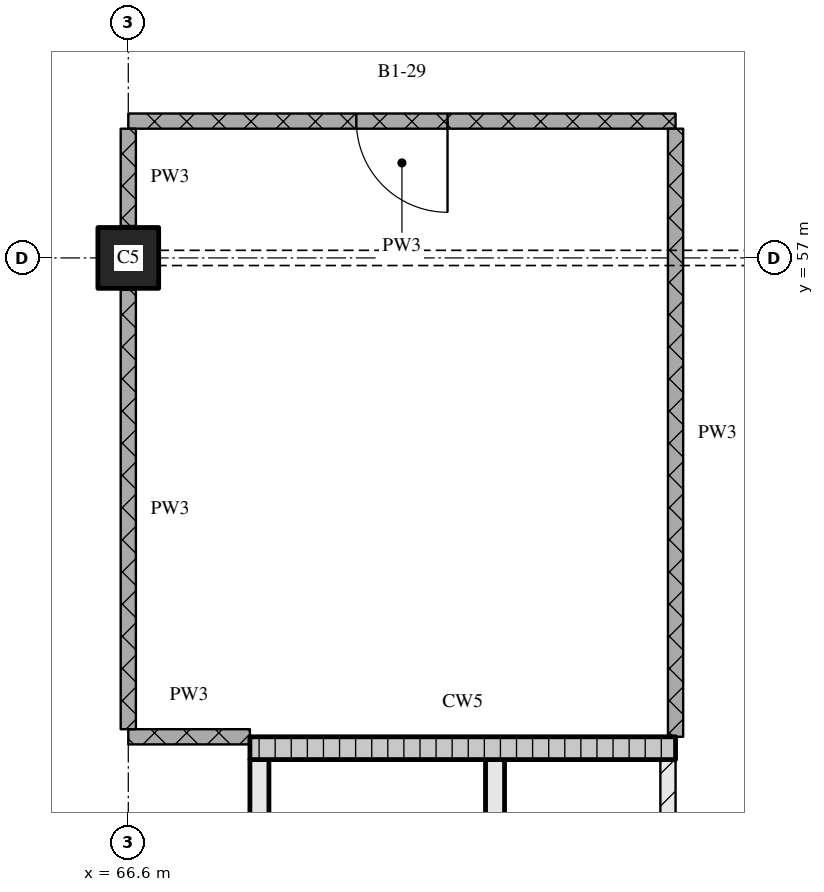
"""IFC4 building model, lengths in metres.
Left out: names, types, materials, properties, quantities, classifications, styles, units other than length and angle.
Written with IfcOpenShell. Run it as: python <this file> out.ifc"""

import sys

from ifc_helpers import new_model, si_unit, direction, frame, frame_2d, origin, origin_2d, place, context, subcontext, project, spatial, rectangle, extrude, element, fill, save


model = new_model("IFC4")
c1 = context("Model", 3, precision=1e-05, world=origin(), true_north=direction((0.0, 1.0)))
c2 = subcontext(c1, "Body", "Model", "MODEL_VIEW")
j1 = project(units=[si_unit("LENGTHUNIT", "METRE"), si_unit("PLANEANGLEUNIT", "RADIAN")], contexts=[c1])
p1 = place(None, origin())
s1 = spatial("IfcSite", under=j1, at=p1, CompositionType="ELEMENT")
p2 = place(p1, origin())
s2 = spatial("IfcBuilding", under=s1, at=p2, CompositionType="ELEMENT")
p3 = place(p2, frame((0.0, 0.0, 102.45)))
s3 = spatial("IfcBuildingStorey", under=s2, at=p3, CompositionType="ELEMENT", Elevation=102.45)
p4 = place(p3, frame((66.6, 57.0, 0.0), z_axis=(0.0, 0.0, 1.0), x_axis=(1.0, 0.0, 0.0)))
e1 = element("IfcColumn", 1, at=p4, inside=s3, PredefinedType="COLUMN", context=c2, shape_type="SweptSolid", body=[
    extrude(rectangle(XDim=0.8, YDim=0.8, at=origin_2d()), origin(), (0.0, 0.0, 1.0), 3.6),
])
p5 = place(p3, frame((68.325, 43.5, 0.0), z_axis=(0.0, 0.0, 1.0), x_axis=(0.0, 1.0, 0.0)))
e2 = element("IfcWall", 2, at=p5, inside=s3, PredefinedType="SOLIDWALL", context=c2, shape_type="SweptSolid", body=[
    extrude(rectangle(XDim=6.9, YDim=0.25, at=frame_2d((3.45, 0.0))), origin(), (0.0, 0.0, 1.0), 3.32),
])
p6 = place(p3, frame((71.425, 43.5, 0.0), z_axis=(0.0, 0.0, 1.0), x_axis=(0.0, 1.0, 0.0)))
e3 = element("IfcWall", 3, at=p6, inside=s3, PredefinedType="SOLIDWALL", context=c2, shape_type="SweptSolid", body=[
    extrude(rectangle(XDim=6.9, YDim=0.25, at=frame_2d((3.45, 0.0))), origin(), (0.0, 0.0, 1.0), 3.32),
])
p7 = place(p6, frame((0.2, 0.0, 0.0)))
e4 = element("IfcOpeningElement", 4, at=p7, cuts=e3, PredefinedType="OPENING", context=c2, shape_type="SweptSolid", body=[
    extrude(rectangle(XDim=1.0, YDim=2.1, at=frame_2d((0.5, 1.05))), frame((0.0, 0.135, 0.0), z_axis=(0.0, -1.0, 0.0), x_axis=(1.0, 0.0, 0.0)), (0.0, 0.0, 1.0), 0.27),
])
p8 = place(p3, frame((73.7, 43.5, 0.0), z_axis=(0.0, 0.0, 1.0), x_axis=(0.0, 1.0, 0.0)))
e5 = element("IfcWall", 5, at=p8, inside=s3, PredefinedType="PARTITIONING", context=c2, shape_type="SweptSolid", body=[
    extrude(rectangle(XDim=6.9, YDim=0.2, at=frame_2d((3.45, 0.0))), origin(), (0.0, 0.0, 1.0), 3.32),
])
p9 = place(p8, frame((1.0, 0.0, 0.0)))
e6 = element("IfcOpeningElement", 6, at=p9, cuts=e5, PredefinedType="OPENING", context=c2, shape_type="SweptSolid", body=[
    extrude(rectangle(XDim=1.0, YDim=2.1, at=frame_2d((0.5, 1.05))), frame((0.0, 0.11, 0.0), z_axis=(0.0, -1.0, 0.0), x_axis=(1.0, 0.0, 0.0)), (0.0, 0.0, 1.0), 0.22),
])
p10 = place(p3, frame((68.2, 50.55, 0.0), z_axis=(0.0, 0.0, 1.0), x_axis=(1.0, 0.0, 0.0)))
e7 = element("IfcWall", 7, at=p10, inside=s3, PredefinedType="SOLIDWALL", context=c2, shape_type="SweptSolid", body=[
    extrude(rectangle(XDim=5.6, YDim=0.3, at=frame_2d((2.8, 0.0))), origin(), (0.0, 0.0, 1.0), 3.32),
])
p11 = place(p3, frame((66.6, 50.7, 0.0), z_axis=(0.0, 0.0, 1.0), x_axis=(1.0, 0.0, 0.0)))
e8 = element("IfcWall", 8, at=p11, inside=s3, PredefinedType="PARTITIONING", context=c2, shape_type="SweptSolid", body=[
    extrude(rectangle(XDim=1.6, YDim=0.2, at=frame_2d((0.8, 0.0))), origin(), (0.0, 0.0, 1.0), 3.32),
])
p12 = place(p3, frame((73.8, 58.8, 0.0), z_axis=(0.0, 0.0, 1.0), x_axis=(-1.0, 0.0, 0.0)))
e9 = element("IfcWall", 9, at=p12, inside=s3, PredefinedType="PARTITIONING", context=c2, shape_type="SweptSolid", body=[
    extrude(rectangle(XDim=7.2, YDim=0.2, at=frame_2d((3.6, 0.0))), origin(), (0.0, 0.0, 1.0), 3.32),
])
p13 = place(p12, frame((3.0, 0.0, 0.0)))
e10 = element("IfcOpeningElement", 10, at=p13, cuts=e9, PredefinedType="OPENING", context=c2, shape_type="SweptSolid", body=[
    extrude(rectangle(XDim=1.2, YDim=2.1, at=frame_2d((0.6, 1.05))), frame((0.0, 0.11, 0.0), z_axis=(0.0, -1.0, 0.0), x_axis=(1.0, 0.0, 0.0)), (0.0, 0.0, 1.0), 0.22),
])
p14 = place(p3, frame((66.6, 56.58, 0.0), z_axis=(0.0, 0.0, 1.0), x_axis=(0.0, -1.0, 0.0)))
e11 = element("IfcWall", 11, at=p14, inside=s3, PredefinedType="PARTITIONING", context=c2, shape_type="SweptSolid", body=[
    extrude(rectangle(XDim=5.78, YDim=0.2, at=frame_2d((2.89, 0.0))), origin(), (0.0, 0.0, 1.0), 3.32),
])
p15 = place(p3, frame((66.6, 58.7, 0.0), z_axis=(0.0, 0.0, 1.0), x_axis=(0.0, -1.0, 0.0)))
e12 = element("IfcWall", 12, at=p15, inside=s3, PredefinedType="PARTITIONING", context=c2, shape_type="SweptSolid", body=[
    extrude(rectangle(XDim=1.28, YDim=0.2, at=frame_2d((0.64, 0.0))), origin(), (0.0, 0.0, 1.0), 3.32),
])
p16 = place(p3, frame((73.8, 58.7, 0.0), z_axis=(0.0, 0.0, 1.0), x_axis=(0.0, -1.0, 0.0)))
e13 = element("IfcWall", 13, at=p16, inside=s3, PredefinedType="PARTITIONING", context=c2, shape_type="SweptSolid", body=[
    extrude(rectangle(XDim=8.0, YDim=0.2, at=frame_2d((4.0, 0.0))), origin(), (0.0, 0.0, 1.0), 3.32),
])
p17 = place(p13, origin())
e14 = element("IfcDoor", 14, at=p17, inside=s3, OperationType="SINGLE_SWING_LEFT", PredefinedType="DOOR", context=c2, shape_type="SweptSolid", body=[
    extrude(rectangle(XDim=1.2, YDim=2.1, at=frame_2d((0.6, 1.05))), frame((0.0, 0.025, 0.0), z_axis=(0.0, -1.0, 0.0), x_axis=(1.0, 0.0, 0.0)), (0.0, 0.0, 1.0), 0.05),
])
fill(e10, e14)
save(model, sys.argv[1])
